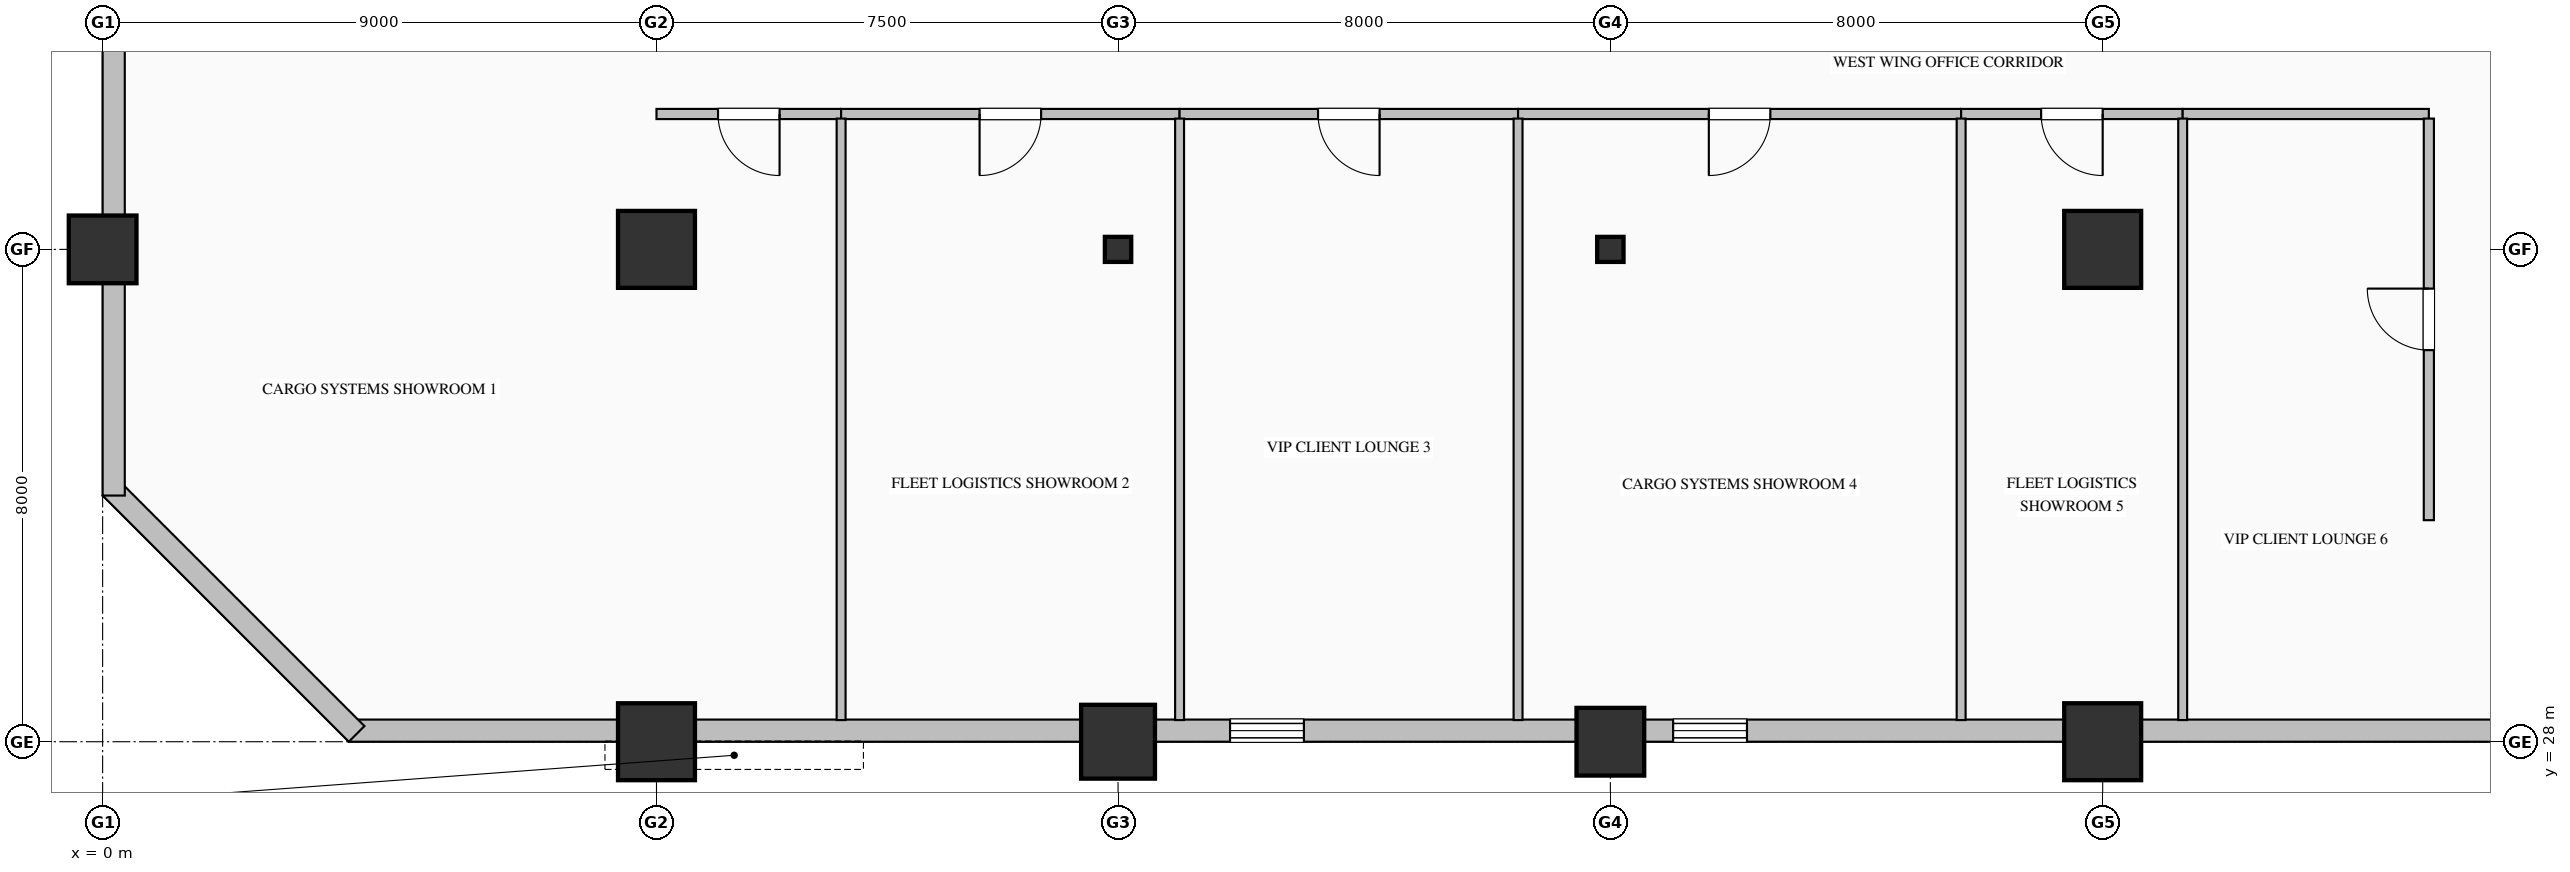
"""IFC4 building model, lengths in metres.
Left out: names, types, materials, properties, quantities, classifications, styles, units other than length and angle.
Written with IfcOpenShell. Run it as: python <this file> out.ifc"""

import sys

from ifc_helpers import new_model, si_unit, direction, frame, frame_2d, origin, origin_2d, place, context, subcontext, project, spatial, rectangle, hollow_rectangle, hollow_circle, i_section, extrude, element, fill, save


model = new_model("IFC4")
c1 = context("Model", 3, precision=1e-05, world=origin(), true_north=direction((0.0, 1.0)))
c2 = subcontext(c1, "Body", "Model", "MODEL_VIEW")
j1 = project(units=[si_unit("LENGTHUNIT", "METRE"), si_unit("PLANEANGLEUNIT", "RADIAN")], contexts=[c1])
p1 = place(None, origin())
s1 = spatial("IfcSite", under=j1, at=p1, CompositionType="ELEMENT")
p2 = place(p1, origin())
s2 = spatial("IfcBuilding", under=s1, at=p2, CompositionType="ELEMENT")
p3 = place(p2, frame((0.0, 0.0, 92.2)))
s3 = spatial("IfcBuildingStorey", under=s2, at=p3, CompositionType="ELEMENT", Elevation=92.2)
p4 = place(p3, frame((0.0, 36.0, 0.0), z_axis=(0.0, 0.0, 1.0), x_axis=(1.0, 0.0, 0.0)))
e1 = element("IfcColumn", 1, at=p4, inside=s3, PredefinedType="COLUMN", context=c2, shape_type="SweptSolid", body=[
    extrude(hollow_rectangle(XDim=1.1, YDim=1.1, WallThickness=0.04, at=origin_2d()), origin(), (0.0, 0.0, 1.0), 4.0),
])
for number, where, z_axis, x_axis in (
    (2, (9.0, 28.0, 0.0), (0.0, 0.0, 1.0), (1.0, 0.0, 0.0)),
    (3, (9.0, 36.0, 0.0), (0.0, 0.0, 1.0), (1.0, 0.0, 0.0)),
):
    element("IfcColumn", number, at=place(p3, frame(where, z_axis=z_axis, x_axis=x_axis)), inside=s3, PredefinedType="COLUMN", context=c2, shape_type="SweptSolid", body=[
        extrude(hollow_rectangle(XDim=1.25, YDim=1.25, WallThickness=0.045, at=origin_2d()), origin(), (0.0, 0.0, 1.0), 4.0),
    ])
p5 = place(p3, frame((16.5, 28.0, 0.0), z_axis=(0.0, 0.0, 1.0), x_axis=(1.0, 0.0, 0.0)))
e4 = element("IfcColumn", 4, at=p5, inside=s3, PredefinedType="COLUMN", context=c2, shape_type="SweptSolid", body=[
    extrude(hollow_circle(Radius=0.6, WallThickness=0.04, at=origin_2d()), origin(), (0.0, 0.0, 1.0), 4.0),
])
p6 = place(p3, frame((16.5, 36.0, 0.0), z_axis=(0.0, 0.0, 1.0), x_axis=(1.0, 0.0, 0.0)))
e5 = element("IfcColumn", 5, at=p6, inside=s3, PredefinedType="COLUMN", context=c2, shape_type="SweptSolid", body=[
    extrude(i_section(OverallWidth=0.407, OverallDepth=0.428, WebThickness=0.02, FlangeThickness=0.035, FilletRadius=0.022, at=origin_2d()), origin(), (0.0, 0.0, 1.0), 4.0),
])
p7 = place(p3, frame((24.5, 28.0, 0.0), z_axis=(0.0, 0.0, 1.0), x_axis=(1.0, 0.0, 0.0)))
e6 = element("IfcColumn", 6, at=p7, inside=s3, PredefinedType="COLUMN", context=c2, shape_type="SweptSolid", body=[
    extrude(hollow_rectangle(XDim=1.1, YDim=1.1, WallThickness=0.04, at=origin_2d()), origin(), (0.0, 0.0, 1.0), 4.0),
])
p8 = place(p3, frame((24.5, 36.0, 0.0), z_axis=(0.0, 0.0, 1.0), x_axis=(1.0, 0.0, 0.0)))
e7 = element("IfcColumn", 7, at=p8, inside=s3, PredefinedType="COLUMN", context=c2, shape_type="SweptSolid", body=[
    extrude(i_section(OverallWidth=0.407, OverallDepth=0.428, WebThickness=0.02, FlangeThickness=0.035, FilletRadius=0.022, at=origin_2d()), origin(), (0.0, 0.0, 1.0), 4.0),
])
for number, where, z_axis, x_axis in (
    (8, (32.5, 28.0, 0.0), (0.0, 0.0, 1.0), (1.0, 0.0, 0.0)),
    (9, (32.5, 36.0, 0.0), (0.0, 0.0, 1.0), (1.0, 0.0, 0.0)),
):
    element("IfcColumn", number, at=place(p3, frame(where, z_axis=z_axis, x_axis=x_axis)), inside=s3, PredefinedType="COLUMN", context=c2, shape_type="SweptSolid", body=[
        extrude(hollow_rectangle(XDim=1.25, YDim=1.25, WallThickness=0.045, at=origin_2d()), origin(), (0.0, 0.0, 1.0), 4.0),
    ])
p9 = place(p3, frame((40.52, 28.18, 0.0), z_axis=(0.0, 0.0, 1.0), x_axis=(-1.0, 0.0, 0.0)))
e10 = element("IfcWall", 10, at=p9, inside=s3, PredefinedType="SOLIDWALL", context=c2, shape_type="SweptSolid", body=[
    extrude(rectangle(XDim=36.52, YDim=0.36, at=frame_2d((18.26, 0.0))), origin(), (0.0, 0.0, 1.0), 3.05),
])
p10 = place(p9, frame((13.8, 0.0, 0.7)))
e11 = element("IfcOpeningElement", 11, at=p10, cuts=e10, PredefinedType="OPENING", context=c2, shape_type="SweptSolid", body=[
    extrude(rectangle(XDim=1.2, YDim=1.85, at=frame_2d((0.6, 0.925))), frame((0.0, 0.19, 0.0), z_axis=(0.0, -1.0, 0.0), x_axis=(1.0, 0.0, 0.0)), (0.0, 0.0, 1.0), 0.38),
])
p11 = place(p9, frame((21.0, 0.0, 0.7)))
e12 = element("IfcOpeningElement", 12, at=p11, cuts=e10, PredefinedType="OPENING", context=c2, shape_type="SweptSolid", body=[
    extrude(rectangle(XDim=1.2, YDim=1.85, at=frame_2d((0.6, 0.925))), frame((0.0, 0.19, 0.0), z_axis=(0.0, -1.0, 0.0), x_axis=(1.0, 0.0, 0.0)), (0.0, 0.0, 1.0), 0.38),
])
p12 = place(p3, frame((4.127, 28.127, 0.0), z_axis=(0.0, 0.0, 1.0), x_axis=(-0.707106781187, 0.707106781187, 0.0)))
e13 = element("IfcWall", 13, at=p12, inside=s3, PredefinedType="SOLIDWALL", context=c2, shape_type="SweptSolid", body=[
    extrude(rectangle(XDim=5.657, YDim=0.36, at=frame_2d((2.828, 0.0))), origin(), (0.0, 0.0, 1.0), 3.75),
])
p13 = place(p3, frame((0.18, 32.0, 0.0), z_axis=(0.0, 0.0, 1.0), x_axis=(0.0, 1.0, 0.0)))
e14 = element("IfcWall", 14, at=p13, inside=s3, PredefinedType="SOLIDWALL", context=c2, shape_type="SweptSolid", body=[
    extrude(rectangle(XDim=16.0, YDim=0.36, at=frame_2d((8.0, 0.0))), origin(), (0.0, 0.0, 1.0), 3.25),
])
p14 = place(p3, frame((12.0, 38.2, 0.0), z_axis=(0.0, 0.0, 1.0), x_axis=(-1.0, 0.0, 0.0)))
e15 = element("IfcWall", 15, at=p14, inside=s3, PredefinedType="PARTITIONING", context=c2, shape_type="SweptSolid", body=[
    extrude(rectangle(XDim=3.0, YDim=0.165, at=frame_2d((1.5, 0.0))), origin(), (0.0, 0.0, 1.0), 3.75),
])
p15 = place(p14, frame((1.0, 0.0, 0.0)))
e16 = element("IfcOpeningElement", 16, at=p15, cuts=e15, PredefinedType="OPENING", context=c2, shape_type="SweptSolid", body=[
    extrude(rectangle(XDim=1.0, YDim=2.15, at=frame_2d((0.5, 1.075))), frame((0.0, 0.093, 0.0), z_axis=(0.0, -1.0, 0.0), x_axis=(1.0, 0.0, 0.0)), (0.0, 0.0, 1.0), 0.185),
])
p16 = place(p3, frame((17.5, 38.2, 0.0), z_axis=(0.0, 0.0, 1.0), x_axis=(-1.0, 0.0, 0.0)))
e17 = element("IfcWall", 17, at=p16, inside=s3, PredefinedType="PARTITIONING", context=c2, shape_type="SweptSolid", body=[
    extrude(rectangle(XDim=5.5, YDim=0.165, at=frame_2d((2.75, 0.0))), origin(), (0.0, 0.0, 1.0), 3.75),
])
p17 = place(p16, frame((2.25, 0.0, 0.0)))
e18 = element("IfcOpeningElement", 18, at=p17, cuts=e17, PredefinedType="OPENING", context=c2, shape_type="SweptSolid", body=[
    extrude(rectangle(XDim=1.0, YDim=2.15, at=frame_2d((0.5, 1.075))), frame((0.0, 0.093, 0.0), z_axis=(0.0, -1.0, 0.0), x_axis=(1.0, 0.0, 0.0)), (0.0, 0.0, 1.0), 0.185),
])
p18 = place(p3, frame((23.0, 38.2, 0.0), z_axis=(0.0, 0.0, 1.0), x_axis=(-1.0, 0.0, 0.0)))
e19 = element("IfcWall", 19, at=p18, inside=s3, PredefinedType="PARTITIONING", context=c2, shape_type="SweptSolid", body=[
    extrude(rectangle(XDim=5.5, YDim=0.165, at=frame_2d((2.75, 0.0))), origin(), (0.0, 0.0, 1.0), 3.75),
])
p19 = place(p18, frame((2.25, 0.0, 0.0)))
e20 = element("IfcOpeningElement", 20, at=p19, cuts=e19, PredefinedType="OPENING", context=c2, shape_type="SweptSolid", body=[
    extrude(rectangle(XDim=1.0, YDim=2.15, at=frame_2d((0.5, 1.075))), frame((0.0, 0.093, 0.0), z_axis=(0.0, -1.0, 0.0), x_axis=(1.0, 0.0, 0.0)), (0.0, 0.0, 1.0), 0.185),
])
p20 = place(p3, frame((30.2, 38.2, 0.0), z_axis=(0.0, 0.0, 1.0), x_axis=(-1.0, 0.0, 0.0)))
e21 = element("IfcWall", 21, at=p20, inside=s3, PredefinedType="PARTITIONING", context=c2, shape_type="SweptSolid", body=[
    extrude(rectangle(XDim=7.2, YDim=0.165, at=frame_2d((3.6, 0.0))), origin(), (0.0, 0.0, 1.0), 3.75),
])
p21 = place(p20, frame((3.1, 0.0, 0.0)))
e22 = element("IfcOpeningElement", 22, at=p21, cuts=e21, PredefinedType="OPENING", context=c2, shape_type="SweptSolid", body=[
    extrude(rectangle(XDim=1.0, YDim=2.15, at=frame_2d((0.5, 1.075))), frame((0.0, 0.093, 0.0), z_axis=(0.0, -1.0, 0.0), x_axis=(1.0, 0.0, 0.0)), (0.0, 0.0, 1.0), 0.185),
])
p22 = place(p3, frame((33.8, 38.2, 0.0), z_axis=(0.0, 0.0, 1.0), x_axis=(-1.0, 0.0, 0.0)))
e23 = element("IfcWall", 23, at=p22, inside=s3, PredefinedType="PARTITIONING", context=c2, shape_type="SweptSolid", body=[
    extrude(rectangle(XDim=3.6, YDim=0.165, at=frame_2d((1.8, 0.0))), origin(), (0.0, 0.0, 1.0), 3.75),
])
p23 = place(p22, frame((1.3, 0.0, 0.0)))
e24 = element("IfcOpeningElement", 24, at=p23, cuts=e23, PredefinedType="OPENING", context=c2, shape_type="SweptSolid", body=[
    extrude(rectangle(XDim=1.0, YDim=2.15, at=frame_2d((0.5, 1.075))), frame((0.0, 0.093, 0.0), z_axis=(0.0, -1.0, 0.0), x_axis=(1.0, 0.0, 0.0)), (0.0, 0.0, 1.0), 0.185),
])
p24 = place(p3, frame((37.8, 38.2, 0.0), z_axis=(0.0, 0.0, 1.0), x_axis=(-1.0, 0.0, 0.0)))
e25 = element("IfcWall", 25, at=p24, inside=s3, PredefinedType="PARTITIONING", context=c2, shape_type="SweptSolid", body=[
    extrude(rectangle(XDim=4.0, YDim=0.165, at=frame_2d((2.0, 0.0))), origin(), (0.0, 0.0, 1.0), 3.75),
])
p25 = place(p3, frame((37.8, 31.6, 0.0), z_axis=(0.0, 0.0, 1.0), x_axis=(0.0, 1.0, 0.0)))
e26 = element("IfcWall", 26, at=p25, inside=s3, PredefinedType="PARTITIONING", context=c2, shape_type="SweptSolid", body=[
    extrude(rectangle(XDim=6.525, YDim=0.165, at=frame_2d((3.263, 0.0))), origin(), (0.0, 0.0, 1.0), 3.75),
])
p26 = place(p25, frame((2.763, 0.0, 0.0)))
e27 = element("IfcOpeningElement", 27, at=p26, cuts=e26, PredefinedType="OPENING", context=c2, shape_type="SweptSolid", body=[
    extrude(rectangle(XDim=1.0, YDim=2.15, at=frame_2d((0.5, 1.075))), frame((0.0, 0.093, 0.0), z_axis=(0.0, -1.0, 0.0), x_axis=(1.0, 0.0, 0.0)), (0.0, 0.0, 1.0), 0.185),
])
for number, where, z_axis, x_axis in (
    (28, (12.0, 38.125, 0.0), (0.0, 0.0, 1.0), (0.0, -1.0, 0.0)),
    (29, (17.5, 38.125, 0.0), (0.0, 0.0, 1.0), (0.0, -1.0, 0.0)),
    (30, (23.0, 38.125, 0.0), (0.0, 0.0, 1.0), (0.0, -1.0, 0.0)),
    (31, (30.2, 38.125, 0.0), (0.0, 0.0, 1.0), (0.0, -1.0, 0.0)),
    (32, (33.8, 38.125, 0.0), (0.0, 0.0, 1.0), (0.0, -1.0, 0.0)),
):
    element("IfcWall", number, at=place(p3, frame(where, z_axis=z_axis, x_axis=x_axis)), inside=s3, PredefinedType="PARTITIONING", context=c2, shape_type="SweptSolid", body=[
        extrude(rectangle(XDim=9.773, YDim=0.145, at=frame_2d((4.887, 0.0))), origin(), (0.0, 0.0, 1.0), 3.75),
    ])
p27 = place(p10, origin())
e33 = element("IfcWindow", 33, at=p27, inside=s3, PartitioningType="DOUBLE_PANEL_VERTICAL", PredefinedType="WINDOW", context=c2, shape_type="SweptSolid", body=[
    extrude(rectangle(XDim=1.2, YDim=1.85, at=frame_2d((0.6, 0.925))), frame((0.0, 0.15, 0.0), z_axis=(0.0, -1.0, 0.0), x_axis=(1.0, 0.0, 0.0)), (0.0, 0.0, 1.0), 0.06),
])
fill(e11, e33)
p28 = place(p11, origin())
e34 = element("IfcWindow", 34, at=p28, inside=s3, PartitioningType="DOUBLE_PANEL_VERTICAL", PredefinedType="WINDOW", context=c2, shape_type="SweptSolid", body=[
    extrude(rectangle(XDim=1.2, YDim=1.85, at=frame_2d((0.6, 0.925))), frame((0.0, 0.15, 0.0), z_axis=(0.0, -1.0, 0.0), x_axis=(1.0, 0.0, 0.0)), (0.0, 0.0, 1.0), 0.06),
])
fill(e12, e34)
p29 = place(p15, origin())
e35 = element("IfcDoor", 35, at=p29, inside=s3, OperationType="SINGLE_SWING_LEFT", PredefinedType="DOOR", context=c2, shape_type="SweptSolid", body=[
    extrude(rectangle(XDim=1.0, YDim=2.15, at=frame_2d((0.5, 1.075))), frame((0.0, 0.025, 0.0), z_axis=(0.0, -1.0, 0.0), x_axis=(1.0, 0.0, 0.0)), (0.0, 0.0, 1.0), 0.05),
])
fill(e16, e35)
p30 = place(p17, origin())
e36 = element("IfcDoor", 36, at=p30, inside=s3, OperationType="SINGLE_SWING_RIGHT", PredefinedType="DOOR", context=c2, shape_type="SweptSolid", body=[
    extrude(rectangle(XDim=1.0, YDim=2.15, at=frame_2d((0.5, 1.075))), frame((0.0, 0.025, 0.0), z_axis=(0.0, -1.0, 0.0), x_axis=(1.0, 0.0, 0.0)), (0.0, 0.0, 1.0), 0.05),
])
fill(e18, e36)
p31 = place(p19, origin())
e37 = element("IfcDoor", 37, at=p31, inside=s3, OperationType="SINGLE_SWING_LEFT", PredefinedType="DOOR", context=c2, shape_type="SweptSolid", body=[
    extrude(rectangle(XDim=1.0, YDim=2.15, at=frame_2d((0.5, 1.075))), frame((0.0, 0.025, 0.0), z_axis=(0.0, -1.0, 0.0), x_axis=(1.0, 0.0, 0.0)), (0.0, 0.0, 1.0), 0.05),
])
fill(e20, e37)
p32 = place(p21, origin())
e38 = element("IfcDoor", 38, at=p32, inside=s3, OperationType="SINGLE_SWING_RIGHT", PredefinedType="DOOR", context=c2, shape_type="SweptSolid", body=[
    extrude(rectangle(XDim=1.0, YDim=2.15, at=frame_2d((0.5, 1.075))), frame((0.0, 0.025, 0.0), z_axis=(0.0, -1.0, 0.0), x_axis=(1.0, 0.0, 0.0)), (0.0, 0.0, 1.0), 0.05),
])
fill(e22, e38)
p33 = place(p23, origin())
e39 = element("IfcDoor", 39, at=p33, inside=s3, OperationType="SINGLE_SWING_LEFT", PredefinedType="DOOR", context=c2, shape_type="SweptSolid", body=[
    extrude(rectangle(XDim=1.0, YDim=2.15, at=frame_2d((0.5, 1.075))), frame((0.0, 0.025, 0.0), z_axis=(0.0, -1.0, 0.0), x_axis=(1.0, 0.0, 0.0)), (0.0, 0.0, 1.0), 0.05),
])
fill(e24, e39)
p34 = place(p26, origin())
e40 = element("IfcDoor", 40, at=p34, inside=s3, OperationType="SINGLE_SWING_RIGHT", PredefinedType="DOOR", context=c2, shape_type="SweptSolid", body=[
    extrude(rectangle(XDim=1.0, YDim=2.15, at=frame_2d((0.5, 1.075))), frame((0.0, 0.025, 0.0), z_axis=(0.0, -1.0, 0.0), x_axis=(1.0, 0.0, 0.0)), (0.0, 0.0, 1.0), 0.05),
])
fill(e27, e40)
save(model, sys.argv[1])
